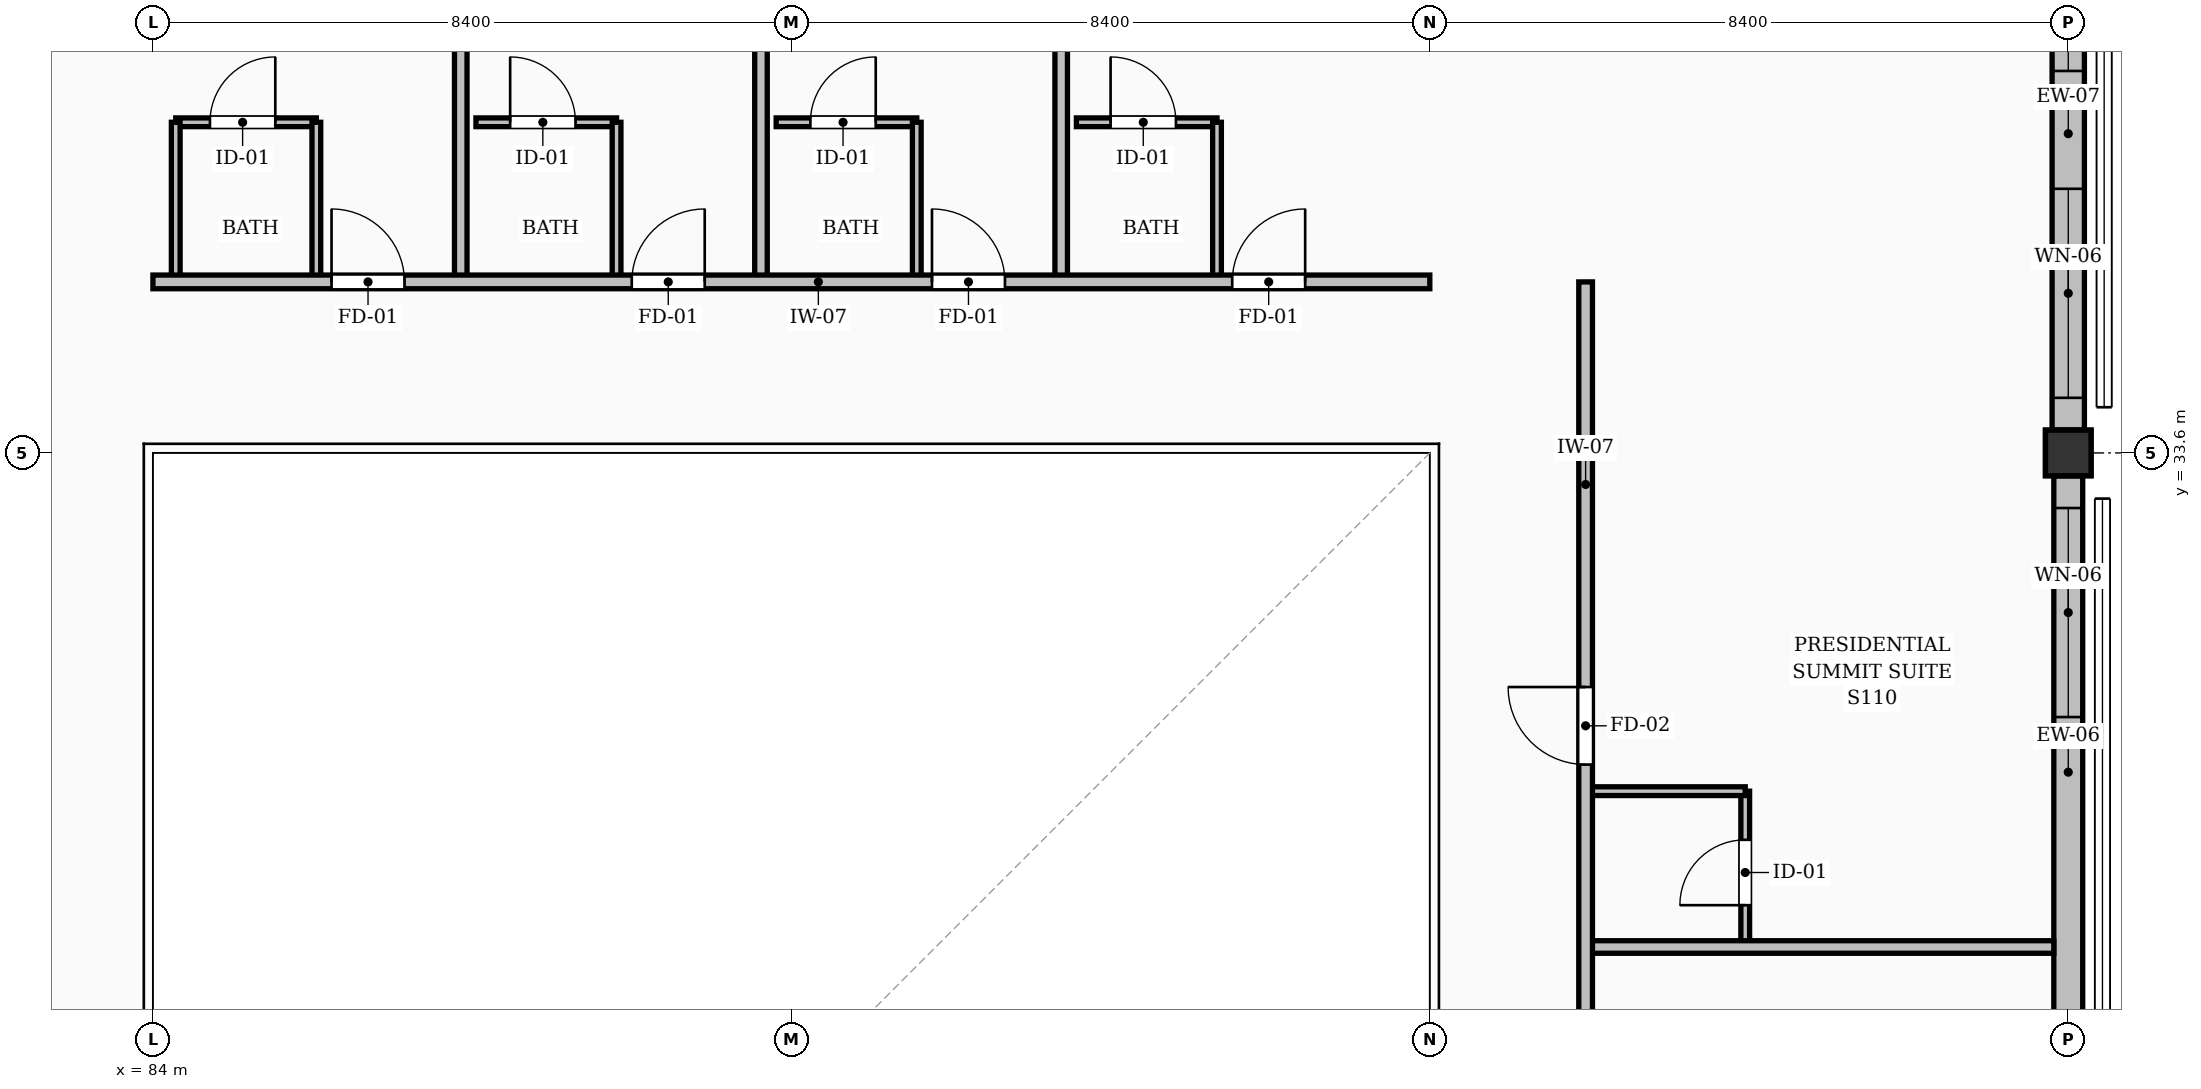
"""IFC4 building model, lengths in metres.
Left out: names, types, materials, properties, quantities, classifications, styles, units other than length and angle.
Written with IfcOpenShell. Run it as: python <this file> out.ifc"""

import sys

from ifc_helpers import new_model, si_unit, direction, frame, frame_2d, origin, origin_2d, place, context, subcontext, project, spatial, rectangle, extrude, element, fill, save


model = new_model("IFC4")
c1 = context("Model", 3, precision=1e-05, world=origin(), true_north=direction((0.0, 1.0)))
c2 = subcontext(c1, "Body", "Model", "MODEL_VIEW")
j1 = project(units=[si_unit("LENGTHUNIT", "METRE"), si_unit("PLANEANGLEUNIT", "RADIAN")], contexts=[c1])
p1 = place(None, origin())
s1 = spatial("IfcSite", under=j1, at=p1, CompositionType="ELEMENT")
p2 = place(p1, origin())
s2 = spatial("IfcBuilding", under=s1, at=p2, CompositionType="ELEMENT")
p3 = place(p2, frame((0.0, 0.0, 3.92)))
s3 = spatial("IfcBuildingStorey", under=s2, at=p3, CompositionType="ELEMENT", Elevation=3.92)
p4 = place(p3, frame((109.2, 33.6, 0.0), z_axis=(0.0, 0.0, 1.0), x_axis=(1.0, 0.0, 0.0)))
e1 = element("IfcColumn", 1, at=p4, inside=s3, PredefinedType="COLUMN", context=c2, shape_type="SweptSolid", body=[
    extrude(rectangle(XDim=0.6, YDim=0.6, at=origin_2d()), origin(), (0.0, 0.0, 1.0), 3.64),
])
p5 = place(p3, frame((109.2, 33.6, 3.64), z_axis=(0.0, 0.0, 1.0), x_axis=(1.0, 0.0, 0.0)))
e2 = element("IfcColumn", 2, at=p5, inside=s3, PredefinedType="COLUMN", context=c2, shape_type="SweptSolid", body=[
    extrude(rectangle(XDim=0.6, YDim=0.6, at=origin_2d()), origin(), (0.0, 0.0, 1.0), 2.067),
])
p6 = place(p3, frame((109.2, 25.501, 0.0), z_axis=(0.0, 0.0, 1.0), x_axis=(0.0, 1.0, 0.0)))
e3 = element("IfcWall", 3, at=p6, inside=s3, PredefinedType="SOLIDWALL", context=c2, shape_type="SweptSolid", body=[
    extrude(rectangle(XDim=7.798, YDim=0.38, at=frame_2d((3.899, 0.0))), origin(), (0.0, 0.0, 1.0), 2.734),
])
p7 = place(p6, frame((4.624, 0.0, 0.25)))
e4 = element("IfcOpeningElement", 4, at=p7, cuts=e3, PredefinedType="OPENING", context=c2, shape_type="SweptSolid", body=[
    extrude(rectangle(XDim=2.75, YDim=1.85, at=frame_2d((1.375, 0.925))), frame((0.0, 0.2, 0.0), z_axis=(0.0, -1.0, 0.0), x_axis=(1.0, 0.0, 0.0)), (0.0, 0.0, 1.0), 0.4),
])
p8 = place(p3, frame((109.2, 33.901, 0.0), z_axis=(0.0, 0.0, 1.0), x_axis=(0.0, 1.0, 0.0)))
e5 = element("IfcWall", 5, at=p8, inside=s3, PredefinedType="SOLIDWALL", context=c2, shape_type="SweptSolid", body=[
    extrude(rectangle(XDim=7.798, YDim=0.425, at=frame_2d((3.899, 0.0))), origin(), (0.0, 0.0, 1.0), 2.734),
])
p9 = place(p8, frame((0.424, 0.0, 0.25)))
e6 = element("IfcOpeningElement", 6, at=p9, cuts=e5, PredefinedType="OPENING", context=c2, shape_type="SweptSolid", body=[
    extrude(rectangle(XDim=2.75, YDim=1.85, at=frame_2d((1.375, 0.925))), frame((0.0, 0.223, 0.0), z_axis=(0.0, -1.0, 0.0), x_axis=(1.0, 0.0, 0.0)), (0.0, 0.0, 1.0), 0.445),
])
p10 = place(p8, frame((4.724, 0.0, 0.25)))
e7 = element("IfcOpeningElement", 7, at=p10, cuts=e5, PredefinedType="OPENING", context=c2, shape_type="SweptSolid", body=[
    extrude(rectangle(XDim=2.55, YDim=1.95, at=frame_2d((1.275, 0.975))), frame((0.0, 0.223, 0.0), z_axis=(0.0, -1.0, 0.0), x_axis=(1.0, 0.0, 0.0)), (0.0, 0.0, 1.0), 0.445),
])
p11 = place(p3, frame((84.3, 37.95, 0.0), z_axis=(0.0, 0.0, 1.0), x_axis=(1.0, 0.0, 0.0)))
e8 = element("IfcWall", 8, at=p11, inside=s3, PredefinedType="PARTITIONING", context=c2, shape_type="SweptSolid", body=[
    extrude(rectangle(XDim=1.85, YDim=0.115, at=frame_2d((0.925, 0.0))), origin(), (0.0, 0.0, 1.0), 3.405),
])
p12 = place(p11, frame((0.45, 0.0, 0.0)))
e9 = element("IfcOpeningElement", 9, at=p12, cuts=e8, PredefinedType="OPENING", context=c2, shape_type="SweptSolid", body=[
    extrude(rectangle(XDim=0.86, YDim=2.05, at=frame_2d((0.43, 1.025))), frame((0.0, 0.067, 0.0), z_axis=(0.0, -1.0, 0.0), x_axis=(1.0, 0.0, 0.0)), (0.0, 0.0, 1.0), 0.135),
])
for number, where, z_axis, x_axis in (
    (10, (86.15, 35.85, 0.0), (0.0, 0.0, 1.0), (0.0, 1.0, 0.0)),
    (11, (84.3, 35.85, 0.0), (0.0, 0.0, 1.0), (0.0, 1.0, 0.0)),
):
    element("IfcWall", number, at=place(p3, frame(where, z_axis=z_axis, x_axis=x_axis)), inside=s3, PredefinedType="PARTITIONING", context=c2, shape_type="SweptSolid", body=[
        extrude(rectangle(XDim=2.1, YDim=0.115, at=frame_2d((1.05, 0.0))), origin(), (0.0, 0.0, 1.0), 3.405),
    ])
p13 = place(p3, frame((88.25, 37.95, 0.0), z_axis=(0.0, 0.0, 1.0), x_axis=(1.0, 0.0, 0.0)))
e12 = element("IfcWall", 12, at=p13, inside=s3, PredefinedType="PARTITIONING", context=c2, shape_type="SweptSolid", body=[
    extrude(rectangle(XDim=1.85, YDim=0.115, at=frame_2d((0.925, 0.0))), origin(), (0.0, 0.0, 1.0), 3.405),
])
p14 = place(p13, frame((0.45, 0.0, 0.0)))
e13 = element("IfcOpeningElement", 13, at=p14, cuts=e12, PredefinedType="OPENING", context=c2, shape_type="SweptSolid", body=[
    extrude(rectangle(XDim=0.86, YDim=2.05, at=frame_2d((0.43, 1.025))), frame((0.0, 0.067, 0.0), z_axis=(0.0, -1.0, 0.0), x_axis=(1.0, 0.0, 0.0)), (0.0, 0.0, 1.0), 0.135),
])
p15 = place(p3, frame((90.1, 35.85, 0.0), z_axis=(0.0, 0.0, 1.0), x_axis=(0.0, 1.0, 0.0)))
e14 = element("IfcWall", 14, at=p15, inside=s3, PredefinedType="PARTITIONING", context=c2, shape_type="SweptSolid", body=[
    extrude(rectangle(XDim=2.1, YDim=0.115, at=frame_2d((1.05, 0.0))), origin(), (0.0, 0.0, 1.0), 3.405),
])
p16 = place(p3, frame((88.05, 35.85, 0.0), z_axis=(0.0, 0.0, 1.0), x_axis=(0.0, 1.0, 0.0)))
e15 = element("IfcWall", 15, at=p16, inside=s3, PredefinedType="PARTITIONING", context=c2, shape_type="SweptSolid", body=[
    extrude(rectangle(XDim=14.375, YDim=0.165, at=frame_2d((7.188, 0.0))), origin(), (0.0, 0.0, 1.0), 3.405),
])
p17 = place(p3, frame((92.2, 37.95, 0.0), z_axis=(0.0, 0.0, 1.0), x_axis=(1.0, 0.0, 0.0)))
e16 = element("IfcWall", 16, at=p17, inside=s3, PredefinedType="PARTITIONING", context=c2, shape_type="SweptSolid", body=[
    extrude(rectangle(XDim=1.85, YDim=0.115, at=frame_2d((0.925, 0.0))), origin(), (0.0, 0.0, 1.0), 3.405),
])
p18 = place(p17, frame((0.45, 0.0, 0.0)))
e17 = element("IfcOpeningElement", 17, at=p18, cuts=e16, PredefinedType="OPENING", context=c2, shape_type="SweptSolid", body=[
    extrude(rectangle(XDim=0.86, YDim=2.05, at=frame_2d((0.43, 1.025))), frame((0.0, 0.067, 0.0), z_axis=(0.0, -1.0, 0.0), x_axis=(1.0, 0.0, 0.0)), (0.0, 0.0, 1.0), 0.135),
])
p19 = place(p3, frame((94.05, 35.85, 0.0), z_axis=(0.0, 0.0, 1.0), x_axis=(0.0, 1.0, 0.0)))
e18 = element("IfcWall", 18, at=p19, inside=s3, PredefinedType="PARTITIONING", context=c2, shape_type="SweptSolid", body=[
    extrude(rectangle(XDim=2.1, YDim=0.115, at=frame_2d((1.05, 0.0))), origin(), (0.0, 0.0, 1.0), 3.405),
])
p20 = place(p3, frame((92.0, 35.85, 0.0), z_axis=(0.0, 0.0, 1.0), x_axis=(0.0, 1.0, 0.0)))
e19 = element("IfcWall", 19, at=p20, inside=s3, PredefinedType="PARTITIONING", context=c2, shape_type="SweptSolid", body=[
    extrude(rectangle(XDim=14.15, YDim=0.165, at=frame_2d((7.075, 0.0))), origin(), (0.0, 0.0, 1.0), 3.405),
])
p21 = place(p3, frame((96.15, 37.95, 0.0), z_axis=(0.0, 0.0, 1.0), x_axis=(1.0, 0.0, 0.0)))
e20 = element("IfcWall", 20, at=p21, inside=s3, PredefinedType="PARTITIONING", context=c2, shape_type="SweptSolid", body=[
    extrude(rectangle(XDim=1.85, YDim=0.115, at=frame_2d((0.925, 0.0))), origin(), (0.0, 0.0, 1.0), 3.405),
])
p22 = place(p21, frame((0.45, 0.0, 0.0)))
e21 = element("IfcOpeningElement", 21, at=p22, cuts=e20, PredefinedType="OPENING", context=c2, shape_type="SweptSolid", body=[
    extrude(rectangle(XDim=0.86, YDim=2.05, at=frame_2d((0.43, 1.025))), frame((0.0, 0.067, 0.0), z_axis=(0.0, -1.0, 0.0), x_axis=(1.0, 0.0, 0.0)), (0.0, 0.0, 1.0), 0.135),
])
p23 = place(p3, frame((98.0, 35.85, 0.0), z_axis=(0.0, 0.0, 1.0), x_axis=(0.0, 1.0, 0.0)))
e22 = element("IfcWall", 22, at=p23, inside=s3, PredefinedType="PARTITIONING", context=c2, shape_type="SweptSolid", body=[
    extrude(rectangle(XDim=2.1, YDim=0.115, at=frame_2d((1.05, 0.0))), origin(), (0.0, 0.0, 1.0), 3.405),
])
p24 = place(p3, frame((95.95, 35.85, 0.0), z_axis=(0.0, 0.0, 1.0), x_axis=(0.0, 1.0, 0.0)))
e23 = element("IfcWall", 23, at=p24, inside=s3, PredefinedType="PARTITIONING", context=c2, shape_type="SweptSolid", body=[
    extrude(rectangle(XDim=14.36, YDim=0.165, at=frame_2d((7.18, 0.0))), origin(), (0.0, 0.0, 1.0), 3.405),
])
p25 = place(p3, frame((84.0, 35.85, 0.0), z_axis=(0.0, 0.0, 1.0), x_axis=(1.0, 0.0, 0.0)))
e24 = element("IfcWall", 24, at=p25, inside=s3, PredefinedType="PARTITIONING", context=c2, shape_type="SweptSolid", body=[
    extrude(rectangle(XDim=16.8, YDim=0.18, at=frame_2d((8.4, 0.0))), origin(), (0.0, 0.0, 1.0), 3.405),
])
p26 = place(p25, frame((2.35, 0.0, 0.0)))
e25 = element("IfcOpeningElement", 25, at=p26, cuts=e24, PredefinedType="OPENING", context=c2, shape_type="SweptSolid", body=[
    extrude(rectangle(XDim=0.96, YDim=2.15, at=frame_2d((0.48, 1.075))), frame((0.0, 0.1, 0.0), z_axis=(0.0, -1.0, 0.0), x_axis=(1.0, 0.0, 0.0)), (0.0, 0.0, 1.0), 0.2),
])
p27 = place(p25, frame((6.3, 0.0, 0.0)))
e26 = element("IfcOpeningElement", 26, at=p27, cuts=e24, PredefinedType="OPENING", context=c2, shape_type="SweptSolid", body=[
    extrude(rectangle(XDim=0.96, YDim=2.15, at=frame_2d((0.48, 1.075))), frame((0.0, 0.1, 0.0), z_axis=(0.0, -1.0, 0.0), x_axis=(1.0, 0.0, 0.0)), (0.0, 0.0, 1.0), 0.2),
])
p28 = place(p25, frame((10.25, 0.0, 0.0)))
e27 = element("IfcOpeningElement", 27, at=p28, cuts=e24, PredefinedType="OPENING", context=c2, shape_type="SweptSolid", body=[
    extrude(rectangle(XDim=0.96, YDim=2.15, at=frame_2d((0.48, 1.075))), frame((0.0, 0.1, 0.0), z_axis=(0.0, -1.0, 0.0), x_axis=(1.0, 0.0, 0.0)), (0.0, 0.0, 1.0), 0.2),
])
p29 = place(p25, frame((14.2, 0.0, 0.0)))
e28 = element("IfcOpeningElement", 28, at=p29, cuts=e24, PredefinedType="OPENING", context=c2, shape_type="SweptSolid", body=[
    extrude(rectangle(XDim=0.96, YDim=2.15, at=frame_2d((0.48, 1.075))), frame((0.0, 0.1, 0.0), z_axis=(0.0, -1.0, 0.0), x_axis=(1.0, 0.0, 0.0)), (0.0, 0.0, 1.0), 0.2),
])
p30 = place(p3, frame((104.95, 27.1, 0.0), z_axis=(0.0, 0.0, 1.0), x_axis=(0.0, 1.0, 0.0)))
e29 = element("IfcWall", 29, at=p30, inside=s3, PredefinedType="PARTITIONING", context=c2, shape_type="SweptSolid", body=[
    extrude(rectangle(XDim=2.05, YDim=0.115, at=frame_2d((1.025, 0.0))), origin(), (0.0, 0.0, 1.0), 3.405),
])
p31 = place(p30, frame((0.55, 0.0, 0.0)))
e30 = element("IfcOpeningElement", 30, at=p31, cuts=e29, PredefinedType="OPENING", context=c2, shape_type="SweptSolid", body=[
    extrude(rectangle(XDim=0.86, YDim=2.05, at=frame_2d((0.43, 1.025))), frame((0.0, 0.067, 0.0), z_axis=(0.0, -1.0, 0.0), x_axis=(1.0, 0.0, 0.0)), (0.0, 0.0, 1.0), 0.135),
])
p32 = place(p3, frame((102.85, 29.15, 0.0), z_axis=(0.0, 0.0, 1.0), x_axis=(1.0, 0.0, 0.0)))
e31 = element("IfcWall", 31, at=p32, inside=s3, PredefinedType="PARTITIONING", context=c2, shape_type="SweptSolid", body=[
    extrude(rectangle(XDim=2.1, YDim=0.115, at=frame_2d((1.05, 0.0))), origin(), (0.0, 0.0, 1.0), 3.405),
])
p33 = place(p3, frame((102.85, 27.1, 0.0), z_axis=(0.0, 0.0, 1.0), x_axis=(1.0, 0.0, 0.0)))
e32 = element("IfcWall", 32, at=p33, inside=s3, PredefinedType="PARTITIONING", context=c2, shape_type="SweptSolid", body=[
    extrude(rectangle(XDim=6.16, YDim=0.165, at=frame_2d((3.08, 0.0))), origin(), (0.0, 0.0, 1.0), 3.405),
])
p34 = place(p3, frame((102.85, 8.59, 0.0), z_axis=(0.0, 0.0, 1.0), x_axis=(0.0, 1.0, 0.0)))
e33 = element("IfcWall", 33, at=p34, inside=s3, PredefinedType="PARTITIONING", context=c2, shape_type="SweptSolid", body=[
    extrude(rectangle(XDim=27.26, YDim=0.18, at=frame_2d((13.63, 0.0))), origin(), (0.0, 0.0, 1.0), 3.405),
])
p35 = place(p34, frame((2.91, 0.0, 0.0)))
e34 = element("IfcOpeningElement", 34, at=p35, cuts=e33, PredefinedType="OPENING", context=c2, shape_type="SweptSolid", body=[
    extrude(rectangle(XDim=1.02, YDim=2.15, at=frame_2d((0.51, 1.075))), frame((0.0, 0.1, 0.0), z_axis=(0.0, -1.0, 0.0), x_axis=(1.0, 0.0, 0.0)), (0.0, 0.0, 1.0), 0.2),
])
p36 = place(p34, frame((8.91, 0.0, 0.0)))
e35 = element("IfcOpeningElement", 35, at=p36, cuts=e33, PredefinedType="OPENING", context=c2, shape_type="SweptSolid", body=[
    extrude(rectangle(XDim=1.02, YDim=2.15, at=frame_2d((0.51, 1.075))), frame((0.0, 0.1, 0.0), z_axis=(0.0, -1.0, 0.0), x_axis=(1.0, 0.0, 0.0)), (0.0, 0.0, 1.0), 0.2),
])
p37 = place(p34, frame((14.91, 0.0, 0.0)))
e36 = element("IfcOpeningElement", 36, at=p37, cuts=e33, PredefinedType="OPENING", context=c2, shape_type="SweptSolid", body=[
    extrude(rectangle(XDim=1.02, YDim=2.15, at=frame_2d((0.51, 1.075))), frame((0.0, 0.1, 0.0), z_axis=(0.0, -1.0, 0.0), x_axis=(1.0, 0.0, 0.0)), (0.0, 0.0, 1.0), 0.2),
])
p38 = place(p34, frame((20.91, 0.0, 0.0)))
e37 = element("IfcOpeningElement", 37, at=p38, cuts=e33, PredefinedType="OPENING", context=c2, shape_type="SweptSolid", body=[
    extrude(rectangle(XDim=1.02, YDim=2.15, at=frame_2d((0.51, 1.075))), frame((0.0, 0.1, 0.0), z_axis=(0.0, -1.0, 0.0), x_axis=(1.0, 0.0, 0.0)), (0.0, 0.0, 1.0), 0.2),
])
p39 = place(p7, origin())
e38 = element("IfcWindow", 38, at=p39, inside=s3, PartitioningType="DOUBLE_PANEL_VERTICAL", PredefinedType="WINDOW", context=c2, shape_type="SweptSolid", body=[
    extrude(rectangle(XDim=2.75, YDim=1.85, at=frame_2d((1.375, 0.925))), frame((0.0, 0.03, 0.0), z_axis=(0.0, -1.0, 0.0), x_axis=(1.0, 0.0, 0.0)), (0.0, 0.0, 1.0), 0.06),
])
fill(e4, e38)
p40 = place(p9, origin())
e39 = element("IfcWindow", 39, at=p40, inside=s3, PartitioningType="DOUBLE_PANEL_VERTICAL", PredefinedType="WINDOW", context=c2, shape_type="SweptSolid", body=[
    extrude(rectangle(XDim=2.75, YDim=1.85, at=frame_2d((1.375, 0.925))), frame((0.0, 0.03, 0.0), z_axis=(0.0, -1.0, 0.0), x_axis=(1.0, 0.0, 0.0)), (0.0, 0.0, 1.0), 0.06),
])
fill(e6, e39)
p41 = place(p10, origin())
e40 = element("IfcWindow", 40, at=p41, inside=s3, PartitioningType="DOUBLE_PANEL_VERTICAL", PredefinedType="WINDOW", context=c2, shape_type="SweptSolid", body=[
    extrude(rectangle(XDim=2.55, YDim=1.95, at=frame_2d((1.275, 0.975))), frame((0.0, 0.03, 0.0), z_axis=(0.0, -1.0, 0.0), x_axis=(1.0, 0.0, 0.0)), (0.0, 0.0, 1.0), 0.06),
])
fill(e7, e40)
p42 = place(p12, origin())
e41 = element("IfcDoor", 41, at=p42, inside=s3, OperationType="SINGLE_SWING_RIGHT", PredefinedType="DOOR", context=c2, shape_type="SweptSolid", body=[
    extrude(rectangle(XDim=0.86, YDim=2.05, at=frame_2d((0.43, 1.025))), frame((0.0, 0.025, 0.0), z_axis=(0.0, -1.0, 0.0), x_axis=(1.0, 0.0, 0.0)), (0.0, 0.0, 1.0), 0.05),
])
fill(e9, e41)
p43 = place(p14, origin())
e42 = element("IfcDoor", 42, at=p43, inside=s3, OperationType="SINGLE_SWING_LEFT", PredefinedType="DOOR", context=c2, shape_type="SweptSolid", body=[
    extrude(rectangle(XDim=0.86, YDim=2.05, at=frame_2d((0.43, 1.025))), frame((0.0, 0.025, 0.0), z_axis=(0.0, -1.0, 0.0), x_axis=(1.0, 0.0, 0.0)), (0.0, 0.0, 1.0), 0.05),
])
fill(e13, e42)
p44 = place(p18, origin())
e43 = element("IfcDoor", 43, at=p44, inside=s3, OperationType="SINGLE_SWING_RIGHT", PredefinedType="DOOR", context=c2, shape_type="SweptSolid", body=[
    extrude(rectangle(XDim=0.86, YDim=2.05, at=frame_2d((0.43, 1.025))), frame((0.0, 0.025, 0.0), z_axis=(0.0, -1.0, 0.0), x_axis=(1.0, 0.0, 0.0)), (0.0, 0.0, 1.0), 0.05),
])
fill(e17, e43)
p45 = place(p22, origin())
e44 = element("IfcDoor", 44, at=p45, inside=s3, OperationType="SINGLE_SWING_LEFT", PredefinedType="DOOR", context=c2, shape_type="SweptSolid", body=[
    extrude(rectangle(XDim=0.86, YDim=2.05, at=frame_2d((0.43, 1.025))), frame((0.0, 0.025, 0.0), z_axis=(0.0, -1.0, 0.0), x_axis=(1.0, 0.0, 0.0)), (0.0, 0.0, 1.0), 0.05),
])
fill(e21, e44)
p46 = place(p26, origin())
e45 = element("IfcDoor", 45, at=p46, inside=s3, OperationType="SINGLE_SWING_LEFT", PredefinedType="DOOR", context=c2, shape_type="SweptSolid", body=[
    extrude(rectangle(XDim=0.96, YDim=2.15, at=frame_2d((0.48, 1.075))), frame((0.0, 0.025, 0.0), z_axis=(0.0, -1.0, 0.0), x_axis=(1.0, 0.0, 0.0)), (0.0, 0.0, 1.0), 0.05),
])
fill(e25, e45)
p47 = place(p27, origin())
e46 = element("IfcDoor", 46, at=p47, inside=s3, OperationType="SINGLE_SWING_RIGHT", PredefinedType="DOOR", context=c2, shape_type="SweptSolid", body=[
    extrude(rectangle(XDim=0.96, YDim=2.15, at=frame_2d((0.48, 1.075))), frame((0.0, 0.025, 0.0), z_axis=(0.0, -1.0, 0.0), x_axis=(1.0, 0.0, 0.0)), (0.0, 0.0, 1.0), 0.05),
])
fill(e26, e46)
p48 = place(p28, origin())
e47 = element("IfcDoor", 47, at=p48, inside=s3, OperationType="SINGLE_SWING_LEFT", PredefinedType="DOOR", context=c2, shape_type="SweptSolid", body=[
    extrude(rectangle(XDim=0.96, YDim=2.15, at=frame_2d((0.48, 1.075))), frame((0.0, 0.025, 0.0), z_axis=(0.0, -1.0, 0.0), x_axis=(1.0, 0.0, 0.0)), (0.0, 0.0, 1.0), 0.05),
])
fill(e27, e47)
p49 = place(p29, origin())
e48 = element("IfcDoor", 48, at=p49, inside=s3, OperationType="SINGLE_SWING_RIGHT", PredefinedType="DOOR", context=c2, shape_type="SweptSolid", body=[
    extrude(rectangle(XDim=0.96, YDim=2.15, at=frame_2d((0.48, 1.075))), frame((0.0, 0.025, 0.0), z_axis=(0.0, -1.0, 0.0), x_axis=(1.0, 0.0, 0.0)), (0.0, 0.0, 1.0), 0.05),
])
fill(e28, e48)
p50 = place(p31, origin())
e49 = element("IfcDoor", 49, at=p50, inside=s3, OperationType="SINGLE_SWING_LEFT", PredefinedType="DOOR", context=c2, shape_type="SweptSolid", body=[
    extrude(rectangle(XDim=0.86, YDim=2.05, at=frame_2d((0.43, 1.025))), frame((0.0, 0.025, 0.0), z_axis=(0.0, -1.0, 0.0), x_axis=(1.0, 0.0, 0.0)), (0.0, 0.0, 1.0), 0.05),
])
fill(e30, e49)
p51 = place(p38, origin())
e50 = element("IfcDoor", 50, at=p51, inside=s3, OperationType="SINGLE_SWING_RIGHT", PredefinedType="DOOR", context=c2, shape_type="SweptSolid", body=[
    extrude(rectangle(XDim=1.02, YDim=2.15, at=frame_2d((0.51, 1.075))), frame((0.0, 0.025, 0.0), z_axis=(0.0, -1.0, 0.0), x_axis=(1.0, 0.0, 0.0)), (0.0, 0.0, 1.0), 0.05),
])
fill(e37, e50)
save(model, sys.argv[1])
